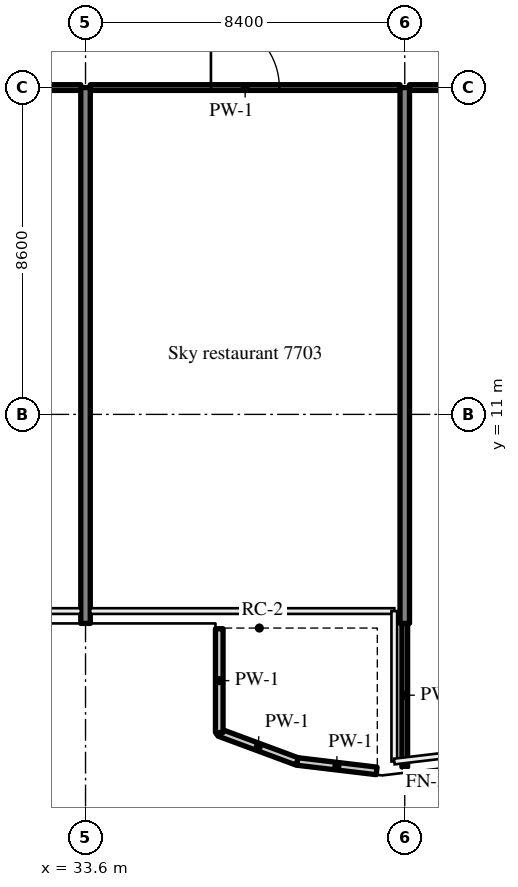
"""IFC4 building model, lengths in metres.
Left out: names, types, materials, properties, quantities, classifications, styles, units other than length and angle.
Written with IfcOpenShell. Run it as: python <this file> out.ifc"""

import sys

from ifc_helpers import new_model, si_unit, direction, frame, frame_2d, origin, place, context, subcontext, project, spatial, rectangle, extrude, source, transform, mapped, element, fill, save


model = new_model("IFC4")
c1 = context("Model", 3, precision=1e-05, world=origin(), true_north=direction((0.0, 1.0)))
c2 = subcontext(c1, "Body", "Model", "MODEL_VIEW")
j1 = project(units=[si_unit("LENGTHUNIT", "METRE"), si_unit("PLANEANGLEUNIT", "RADIAN")], contexts=[c1])
p1 = place(None, origin())
s1 = spatial("IfcSite", under=j1, at=p1, CompositionType="ELEMENT")
p2 = place(p1, origin())
s2 = spatial("IfcBuilding", under=s1, at=p2, CompositionType="ELEMENT")
p3 = place(p2, frame((0.0, 0.0, 323.7)))
s3 = spatial("IfcBuildingStorey", under=s2, at=p3, CompositionType="ELEMENT", Elevation=323.7)
m1 = source(origin(), c2, "Body", "SweptSolid", [
    extrude(rectangle(XDim=14.1, YDim=0.25, at=frame_2d((7.05, 0.0))), origin(), (0.0, 0.0, 1.0), 5.72),
])
for number, where, z_axis, x_axis in (
    (1, (33.6, 5.5, 0.0), (0.0, 0.0, 1.0), (0.0, 1.0, 0.0)),
    (2, (42.0, 5.5, 0.0), (0.0, 0.0, 1.0), (0.0, 1.0, 0.0)),
):
    element("IfcWall", number, at=place(p3, frame(where, z_axis=z_axis, x_axis=x_axis)), inside=s3, PredefinedType="SHEAR", context=c2, shape_type="MappedRepresentation", body=[
        mapped(m1, transform((0.0, 0.0, 0.0), scale=1.0)),
    ])
m2 = source(origin(), c2, "Body", "SweptSolid", [
    extrude(rectangle(XDim=2.105, YDim=0.2, at=frame_2d((1.052, 0.0))), origin(), (0.0, 0.0, 1.0), 1.1),
])
p4 = place(p3, frame((41.26, 1.619, -0.05), z_axis=(0.0, 0.0, 1.0), x_axis=(-0.992992163316, 0.118180216587, 0.0)))
e3 = element("IfcWall", 3, at=p4, inside=s3, PredefinedType="PARAPET", context=c2, shape_type="MappedRepresentation", body=[
    mapped(m2, transform((0.0, 0.0, 0.0), scale=1.0)),
])
m3 = source(origin(), c2, "Body", "SweptSolid", [
    extrude(rectangle(XDim=2.187, YDim=0.2, at=frame_2d((1.094, 0.0))), origin(), (0.0, 0.0, 1.0), 1.1),
])
p5 = place(p3, frame((39.17, 1.868, -0.05), z_axis=(0.0, 0.0, 1.0), x_axis=(-0.937570914704, 0.347794163121, 0.0)))
e4 = element("IfcWall", 4, at=p5, inside=s3, PredefinedType="PARAPET", context=c2, shape_type="MappedRepresentation", body=[
    mapped(m3, transform((0.0, 0.0, 0.0), scale=1.0)),
])
m4 = source(origin(), c2, "Body", "SweptSolid", [
    extrude(rectangle(XDim=2.731, YDim=0.2, at=frame_2d((1.366, 0.0))), origin(), (0.0, 0.0, 1.0), 1.1),
])
p6 = place(p3, frame((37.119, 2.629, -0.05), z_axis=(0.0, 0.0, 1.0), x_axis=(0.0, 1.0, 0.0)))
e5 = element("IfcWall", 5, at=p6, inside=s3, PredefinedType="PARAPET", context=c2, shape_type="MappedRepresentation", body=[
    mapped(m4, transform((0.0, 0.0, 0.0), scale=1.0)),
])
m5 = source(origin(), c2, "Body", "SweptSolid", [
    extrude(rectangle(XDim=8.15, YDim=0.15, at=frame_2d((4.075, 0.0))), origin(), (0.0, 0.0, 1.0), 5.02),
])
p7 = place(p3, frame((25.325, 19.6, 0.0), z_axis=(0.0, 0.0, 1.0), x_axis=(1.0, 0.0, 0.0)))
e6 = element("IfcWall", 6, at=p7, inside=s3, PredefinedType="PARTITIONING", context=c2, shape_type="MappedRepresentation", body=[
    mapped(m5, transform((0.0, 0.0, 0.0), scale=1.0)),
])
m6 = source(origin(), c2, "Body", "SweptSolid", [
    extrude(rectangle(XDim=1.8, YDim=2.1, at=frame_2d((0.9, 1.05))), frame((0.0, 0.085, 0.0), z_axis=(0.0, -1.0, 0.0), x_axis=(1.0, 0.0, 0.0)), (0.0, 0.0, 1.0), 0.17),
])
p8 = place(p7, frame((3.175, 0.0, 0.0)))
e7 = element("IfcOpeningElement", 7, at=p8, cuts=e6, PredefinedType="OPENING", context=c2, shape_type="MappedRepresentation", body=[
    mapped(m6, transform((0.0, 0.0, 0.0), scale=1.0)),
])
m7 = source(origin(), c2, "Body", "SweptSolid", [
    extrude(rectangle(XDim=8.15, YDim=0.15, at=frame_2d((4.075, 0.0))), origin(), (0.0, 0.0, 1.0), 5.02),
])
p9 = place(p3, frame((33.725, 19.6, 0.0), z_axis=(0.0, 0.0, 1.0), x_axis=(1.0, 0.0, 0.0)))
e8 = element("IfcWall", 8, at=p9, inside=s3, PredefinedType="PARTITIONING", context=c2, shape_type="MappedRepresentation", body=[
    mapped(m7, transform((0.0, 0.0, 0.0), scale=1.0)),
])
p10 = place(p9, frame((3.175, 0.0, 0.0)))
e9 = element("IfcOpeningElement", 9, at=p10, cuts=e8, PredefinedType="OPENING", context=c2, shape_type="MappedRepresentation", body=[
    mapped(m6, transform((0.0, 0.0, 0.0), scale=1.0)),
])
p11 = place(p3, frame((42.125, 19.6, 0.0), z_axis=(0.0, 0.0, 1.0), x_axis=(1.0, 0.0, 0.0)))
e10 = element("IfcWall", 10, at=p11, inside=s3, PredefinedType="PARTITIONING", context=c2, shape_type="MappedRepresentation", body=[
    mapped(m7, transform((0.0, 0.0, 0.0), scale=1.0)),
])
p12 = place(p11, frame((3.175, 0.0, 0.0)))
e11 = element("IfcOpeningElement", 11, at=p12, cuts=e10, PredefinedType="OPENING", context=c2, shape_type="MappedRepresentation", body=[
    mapped(m6, transform((0.0, 0.0, 0.0), scale=1.0)),
])
m8 = source(origin(), c2, "Body", "SweptSolid", [
    extrude(rectangle(XDim=3.778, YDim=0.15, at=frame_2d((1.889, 0.0))), origin(), (0.0, 0.0, 1.0), 5.72),
])
p13 = place(p3, frame((42.0, 1.722, 0.0), z_axis=(0.0, 0.0, 1.0), x_axis=(0.0, 1.0, 0.0)))
e12 = element("IfcWall", 12, at=p13, inside=s3, PredefinedType="PARTITIONING", context=c2, shape_type="MappedRepresentation", body=[
    mapped(m8, transform((0.0, 0.0, 0.0), scale=1.0)),
])
m9 = source(origin(), c2, "Body", "SweptSolid", [
    extrude(rectangle(XDim=1.8, YDim=2.1, at=frame_2d((0.9, 1.05))), frame((0.0, 0.025, 0.0), z_axis=(0.0, -1.0, 0.0), x_axis=(1.0, 0.0, 0.0)), (0.0, 0.0, 1.0), 0.05),
])
p14 = place(p10, origin())
e13 = element("IfcDoor", 13, at=p14, inside=s3, OperationType="DOUBLE_DOOR_SINGLE_SWING", PredefinedType="DOOR", context=c2, shape_type="MappedRepresentation", body=[
    mapped(m9, transform((0.0, 0.0, 0.0), scale=1.0)),
])
fill(e9, e13)
save(model, sys.argv[1])
